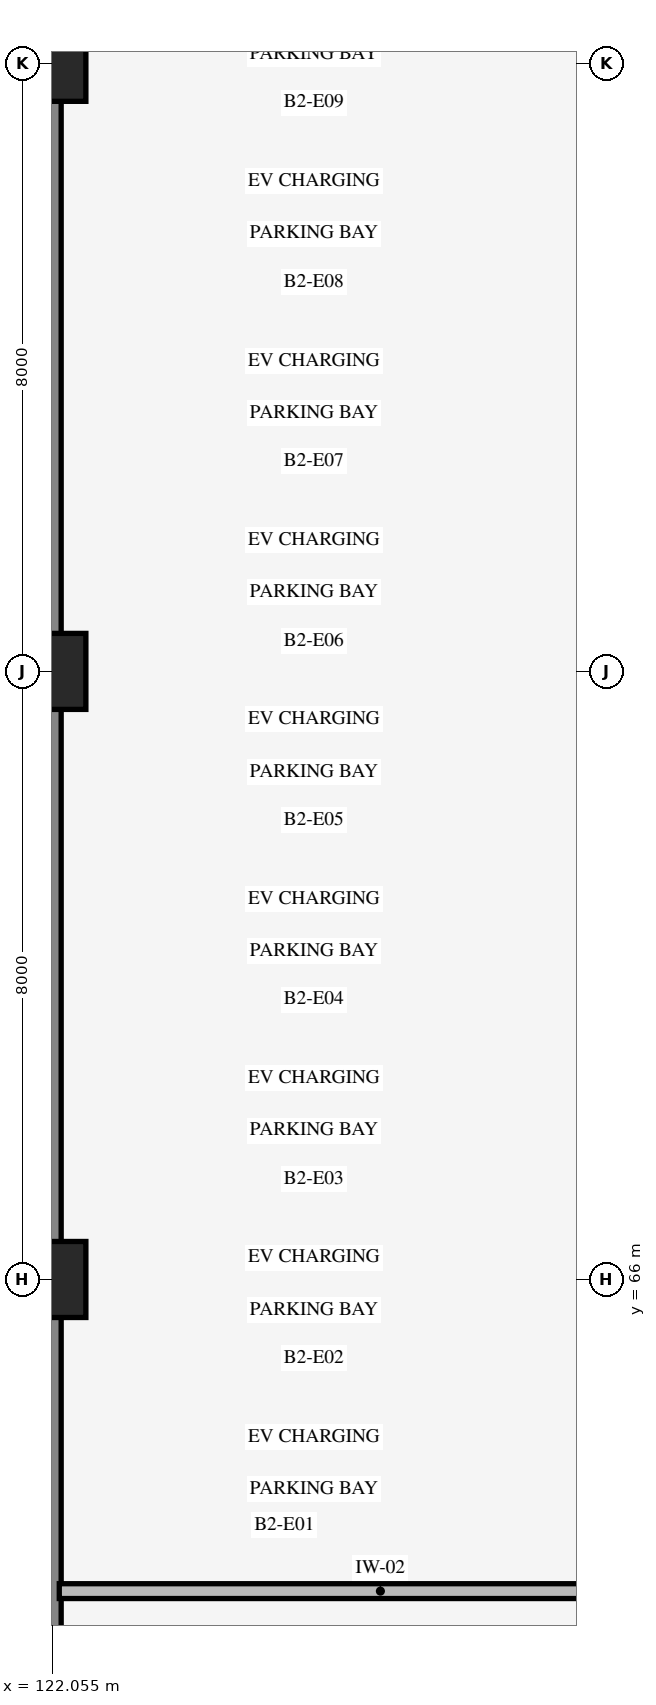
"""IFC4 building model, lengths in metres.
Left out: names, types, materials, properties, quantities, classifications, styles, units other than length and angle.
Written with IfcOpenShell. Run it as: python <this file> out.ifc"""

import sys

from ifc_helpers import new_model, si_unit, direction, frame, frame_2d, origin, origin_2d, place, context, subcontext, project, spatial, rectangle, extrude, element, save


model = new_model("IFC4")
c1 = context("Model", 3, precision=1e-05, world=origin(), true_north=direction((0.0, 1.0)))
c2 = subcontext(c1, "Body", "Model", "MODEL_VIEW")
j1 = project(units=[si_unit("LENGTHUNIT", "METRE"), si_unit("PLANEANGLEUNIT", "RADIAN")], contexts=[c1])
p1 = place(None, origin())
s1 = spatial("IfcSite", under=j1, at=p1, CompositionType="ELEMENT")
p2 = place(p1, origin())
s2 = spatial("IfcBuilding", under=s1, at=p2, CompositionType="ELEMENT")
p3 = place(p2, frame((0.0, 0.0, -9.0)))
s3 = spatial("IfcBuildingStorey", under=s2, at=p3, CompositionType="ELEMENT", Elevation=-9.0)
p4 = place(p3, frame((122.0, 106.0, 0.0), z_axis=(0.0, 0.0, 1.0), x_axis=(0.0, -1.0, 0.0)))
e1 = element("IfcWall", 1, at=p4, inside=s3, PredefinedType="SOLIDWALL", context=c2, shape_type="SweptSolid", body=[
    extrude(rectangle(XDim=80.0, YDim=0.35, at=frame_2d((40.0, 0.0))), origin(), (0.0, 0.0, 1.0), 4.22),
])
for number, where, z_axis, x_axis in (
    (2, (122.0, 66.0, 0.0), (0.0, 0.0, 1.0), (1.0, 0.0, 0.0)),
    (3, (122.0, 74.0, 0.0), (0.0, 0.0, 1.0), (1.0, 0.0, 0.0)),
    (4, (122.0, 82.0, 0.0), (0.0, 0.0, 1.0), (1.0, 0.0, 0.0)),
):
    element("IfcColumn", number, at=place(p3, frame(where, z_axis=z_axis, x_axis=x_axis)), inside=s3, PredefinedType="COLUMN", context=c2, shape_type="SweptSolid", body=[
        extrude(rectangle(XDim=1.0, YDim=1.0, at=origin_2d()), origin(), (0.0, 0.0, 1.0), 4.5),
    ])
p5 = place(p3, frame((122.15, 61.9, 0.0), z_axis=(0.0, 0.0, 1.0), x_axis=(1.0, 0.0, 0.0)))
e5 = element("IfcWall", 5, at=p5, inside=s3, PredefinedType="STANDARD", context=c2, shape_type="SweptSolid", body=[
    extrude(rectangle(XDim=8.45, YDim=0.195, at=frame_2d((4.225, 0.0))), origin(), (0.0, 0.0, 1.0), 4.2),
])
save(model, sys.argv[1])
